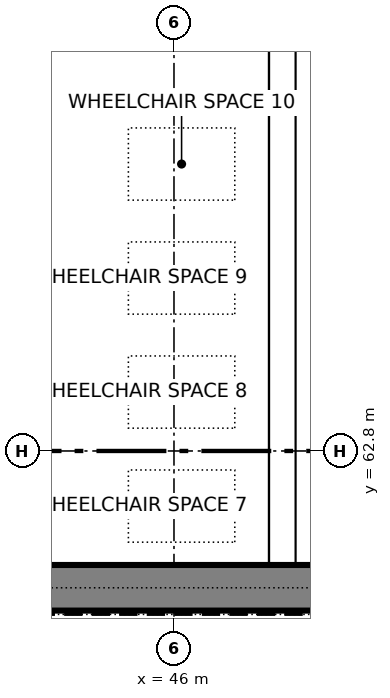
"""IFC4 building model, lengths in metres.
Left out: names, types, materials, properties, quantities, classifications, styles, units other than length and angle.
Written with IfcOpenShell. Run it as: python <this file> out.ifc"""

import sys

from ifc_helpers import new_model, si_unit, direction, frame, frame_2d, origin, origin_2d, place, context, subcontext, project, spatial, rectangle, extrude, element, save


model = new_model("IFC4")
c1 = context("Model", 3, precision=1e-05, world=origin(), true_north=direction((0.0, 1.0)))
c2 = subcontext(c1, "Body", "Model", "MODEL_VIEW")
j1 = project(units=[si_unit("LENGTHUNIT", "METRE"), si_unit("PLANEANGLEUNIT", "RADIAN")], contexts=[c1])
p1 = place(None, origin())
s1 = spatial("IfcSite", under=j1, at=p1, CompositionType="ELEMENT")
p2 = place(p1, origin())
s2 = spatial("IfcBuilding", under=s1, at=p2, CompositionType="ELEMENT")
p3 = place(p2, origin())
s3 = spatial("IfcBuildingStorey", under=s2, at=p3, CompositionType="ELEMENT", Elevation=0.0)
p4 = place(p3, frame((36.5, 61.0, 0.0), z_axis=(0.0, 0.0, 1.0), x_axis=(1.0, 0.0, 0.0)))
e1 = element("IfcWall", 1, at=p4, inside=s3, PredefinedType="SOLIDWALL", context=c2, shape_type="SweptSolid", body=[
    extrude(rectangle(XDim=52.6, YDim=0.6, at=frame_2d((26.3, 0.0))), origin(), (0.0, 0.0, 1.0), 5.4),
])
p5 = place(p4, frame((35.6, 0.0, 0.0)))
e2 = element("IfcOpeningElement", 2, at=p5, cuts=e1, PredefinedType="OPENING", context=c2, shape_type="SweptSolid", body=[
    extrude(rectangle(XDim=1.8, YDim=2.1, at=frame_2d((0.9, 1.05))), frame((0.0, 0.31, 0.0), z_axis=(0.0, -1.0, 0.0), x_axis=(1.0, 0.0, 0.0)), (0.0, 0.0, 1.0), 0.62),
])
p6 = place(p4, frame((39.6, 0.0, 0.0)))
e3 = element("IfcOpeningElement", 3, at=p6, cuts=e1, PredefinedType="OPENING", context=c2, shape_type="SweptSolid", body=[
    extrude(rectangle(XDim=1.8, YDim=2.1, at=frame_2d((0.9, 1.05))), frame((0.0, 0.31, 0.0), z_axis=(0.0, -1.0, 0.0), x_axis=(1.0, 0.0, 0.0)), (0.0, 0.0, 1.0), 0.62),
])
p7 = place(p3, frame((42.48, 61.0, -0.3), z_axis=(0.0, 0.0, 1.0), x_axis=(1.0, 0.0, 0.0)))
e4 = element("IfcWall", 4, at=p7, inside=s3, PredefinedType="SOLIDWALL", context=c2, shape_type="SweptSolid", body=[
    extrude(rectangle(XDim=3.04, YDim=0.6, at=frame_2d((1.52, 0.0))), origin(), (0.0, 0.0, 1.0), 0.3),
])
p8 = place(p3, frame((45.52, 61.0, -0.3), z_axis=(0.0, 0.0, 1.0), x_axis=(1.0, 0.0, 0.0)))
e5 = element("IfcWall", 5, at=p8, inside=s3, PredefinedType="SOLIDWALL", context=c2, shape_type="SweptSolid", body=[
    extrude(rectangle(XDim=2.96, YDim=0.6, at=frame_2d((1.48, 0.0))), origin(), (0.0, 0.0, 1.0), 0.3),
])
for number, where, z_axis, x_axis in (
    (6, (47.25, 62.3, -0.3), (0.0, 0.0, 1.0), (1.0, 0.0, 0.0)),
    (7, (47.25, 66.043, -0.3), (0.0, 0.0, 1.0), (1.0, 0.0, 0.0)),
):
    element("IfcColumn", number, at=place(p3, frame(where, z_axis=z_axis, x_axis=x_axis)), inside=s3, PredefinedType="COLUMN", context=c2, shape_type="SweptSolid", body=[
        extrude(rectangle(XDim=0.7, YDim=0.7, at=origin_2d()), origin(), (0.0, 0.0, 1.0), 1.8),
    ])
save(model, sys.argv[1])
